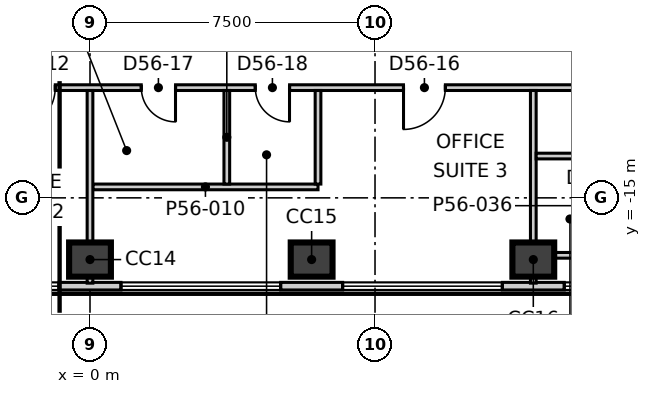
"""IFC4 building model, lengths in metres.
Left out: names, types, materials, properties, quantities, classifications, styles, units other than length and angle.
Written with IfcOpenShell. Run it as: python <this file> out.ifc"""

import sys

from ifc_helpers import new_model, si_unit, direction, frame, frame_2d, origin, origin_2d, place, context, subcontext, project, spatial, rectangle, extrude, element, fill, save


model = new_model("IFC4")
c1 = context("Model", 3, precision=1e-05, world=origin(), true_north=direction((0.0, 1.0)))
c2 = subcontext(c1, "Body", "Model", "MODEL_VIEW")
j1 = project(units=[si_unit("LENGTHUNIT", "METRE"), si_unit("PLANEANGLEUNIT", "RADIAN")], contexts=[c1])
p1 = place(None, origin())
s1 = spatial("IfcSite", under=j1, at=p1, CompositionType="ELEMENT")
p2 = place(p1, origin())
s2 = spatial("IfcBuilding", under=s1, at=p2, CompositionType="ELEMENT")
p3 = place(p2, frame((0.0, 0.0, 239.3)))
s3 = spatial("IfcBuildingStorey", under=s2, at=p3, CompositionType="ELEMENT", Elevation=239.3)
for number, where, z_axis, x_axis in (
    (1, (0.0, -16.624, -0.3), (0.0, 0.0, 1.0), (1.0, 0.0, 0.0)),
    (2, (5.832, -16.624, -0.3), (0.0, 0.0, 1.0), (1.0, 0.0, 0.0)),
    (3, (11.665, -16.624, -0.3), (0.0, 0.0, 1.0), (1.0, 0.0, 0.0)),
):
    element("IfcColumn", number, at=place(p3, frame(where, z_axis=z_axis, x_axis=x_axis)), inside=s3, PredefinedType="COLUMN", context=c2, shape_type="SweptSolid", body=[
        extrude(rectangle(XDim=1.1, YDim=0.9, at=origin_2d()), origin(), (0.0, 0.0, 1.0), 4.0),
    ])
p4 = place(p3, frame((-24.633, -17.324, 0.0), z_axis=(0.0, 0.0, 1.0), x_axis=(1.0, 0.0, 0.0)))
e4 = element("IfcWall", 4, at=p4, inside=s3, PredefinedType="ELEMENTEDWALL", context=c2, shape_type="SweptSolid", body=[
    extrude(rectangle(XDim=49.246, YDim=0.2, at=frame_2d((24.623, 0.0))), origin(), (0.0, 0.0, 1.0), 3.7),
])
p5 = place(p4, frame((2.119, 0.0, 0.9)))
e5 = element("IfcOpeningElement", 5, at=p5, cuts=e4, PredefinedType="OPENING", context=c2, shape_type="SweptSolid", body=[
    extrude(rectangle(XDim=4.2, YDim=2.5, at=frame_2d((2.1, 1.25))), frame((0.0, 0.11, 0.0), z_axis=(0.0, -1.0, 0.0), x_axis=(1.0, 0.0, 0.0)), (0.0, 0.0, 1.0), 0.22),
])
p6 = place(p4, frame((7.952, 0.0, 0.9)))
e6 = element("IfcOpeningElement", 6, at=p6, cuts=e4, PredefinedType="OPENING", context=c2, shape_type="SweptSolid", body=[
    extrude(rectangle(XDim=4.2, YDim=2.5, at=frame_2d((2.1, 1.25))), frame((0.0, 0.11, 0.0), z_axis=(0.0, -1.0, 0.0), x_axis=(1.0, 0.0, 0.0)), (0.0, 0.0, 1.0), 0.22),
])
p7 = place(p4, frame((13.784, 0.0, 0.9)))
e7 = element("IfcOpeningElement", 7, at=p7, cuts=e4, PredefinedType="OPENING", context=c2, shape_type="SweptSolid", body=[
    extrude(rectangle(XDim=4.2, YDim=2.5, at=frame_2d((2.1, 1.25))), frame((0.0, 0.11, 0.0), z_axis=(0.0, -1.0, 0.0), x_axis=(1.0, 0.0, 0.0)), (0.0, 0.0, 1.0), 0.22),
])
p8 = place(p4, frame((19.617, 0.0, 0.9)))
e8 = element("IfcOpeningElement", 8, at=p8, cuts=e4, PredefinedType="OPENING", context=c2, shape_type="SweptSolid", body=[
    extrude(rectangle(XDim=4.2, YDim=2.5, at=frame_2d((2.1, 1.25))), frame((0.0, 0.11, 0.0), z_axis=(0.0, -1.0, 0.0), x_axis=(1.0, 0.0, 0.0)), (0.0, 0.0, 1.0), 0.22),
])
p9 = place(p4, frame((25.449, 0.0, 0.9)))
e9 = element("IfcOpeningElement", 9, at=p9, cuts=e4, PredefinedType="OPENING", context=c2, shape_type="SweptSolid", body=[
    extrude(rectangle(XDim=4.2, YDim=2.5, at=frame_2d((2.1, 1.25))), frame((0.0, 0.11, 0.0), z_axis=(0.0, -1.0, 0.0), x_axis=(1.0, 0.0, 0.0)), (0.0, 0.0, 1.0), 0.22),
])
p10 = place(p4, frame((31.282, 0.0, 0.9)))
e10 = element("IfcOpeningElement", 10, at=p10, cuts=e4, PredefinedType="OPENING", context=c2, shape_type="SweptSolid", body=[
    extrude(rectangle(XDim=4.2, YDim=2.5, at=frame_2d((2.1, 1.25))), frame((0.0, 0.11, 0.0), z_axis=(0.0, -1.0, 0.0), x_axis=(1.0, 0.0, 0.0)), (0.0, 0.0, 1.0), 0.22),
])
p11 = place(p4, frame((37.114, 0.0, 0.9)))
e11 = element("IfcOpeningElement", 11, at=p11, cuts=e4, PredefinedType="OPENING", context=c2, shape_type="SweptSolid", body=[
    extrude(rectangle(XDim=4.2, YDim=2.5, at=frame_2d((2.1, 1.25))), frame((0.0, 0.11, 0.0), z_axis=(0.0, -1.0, 0.0), x_axis=(1.0, 0.0, 0.0)), (0.0, 0.0, 1.0), 0.22),
])
p12 = place(p4, frame((42.947, 0.0, 0.9)))
e12 = element("IfcOpeningElement", 12, at=p12, cuts=e4, PredefinedType="OPENING", context=c2, shape_type="SweptSolid", body=[
    extrude(rectangle(XDim=4.2, YDim=2.5, at=frame_2d((2.1, 1.25))), frame((0.0, 0.11, 0.0), z_axis=(0.0, -1.0, 0.0), x_axis=(1.0, 0.0, 0.0)), (0.0, 0.0, 1.0), 0.22),
])
p13 = place(p3, frame((27.32, -12.671, 0.0), z_axis=(0.0, 0.0, 1.0), x_axis=(-0.499995097538, 0.866028234204, 0.0)))
e13 = element("IfcWall", 13, at=p13, inside=s3, PredefinedType="ELEMENTEDWALL", context=c2, shape_type="SweptSolid", body=[
    extrude(rectangle(XDim=49.247, YDim=0.2, at=frame_2d((24.623, 0.0))), origin(), (0.0, 0.0, 1.0), 3.7),
])
p14 = place(p13, frame((2.119, 0.0, 0.9)))
e14 = element("IfcOpeningElement", 14, at=p14, cuts=e13, PredefinedType="OPENING", context=c2, shape_type="SweptSolid", body=[
    extrude(rectangle(XDim=4.2, YDim=2.5, at=frame_2d((2.1, 1.25))), frame((0.0, 0.11, 0.0), z_axis=(0.0, -1.0, 0.0), x_axis=(1.0, 0.0, 0.0)), (0.0, 0.0, 1.0), 0.22),
])
p15 = place(p13, frame((7.952, 0.0, 0.9)))
e15 = element("IfcOpeningElement", 15, at=p15, cuts=e13, PredefinedType="OPENING", context=c2, shape_type="SweptSolid", body=[
    extrude(rectangle(XDim=4.2, YDim=2.5, at=frame_2d((2.1, 1.25))), frame((0.0, 0.11, 0.0), z_axis=(0.0, -1.0, 0.0), x_axis=(1.0, 0.0, 0.0)), (0.0, 0.0, 1.0), 0.22),
])
p16 = place(p13, frame((13.784, 0.0, 0.9)))
e16 = element("IfcOpeningElement", 16, at=p16, cuts=e13, PredefinedType="OPENING", context=c2, shape_type="SweptSolid", body=[
    extrude(rectangle(XDim=4.2, YDim=2.5, at=frame_2d((2.1, 1.25))), frame((0.0, 0.11, 0.0), z_axis=(0.0, -1.0, 0.0), x_axis=(1.0, 0.0, 0.0)), (0.0, 0.0, 1.0), 0.22),
])
p17 = place(p13, frame((19.617, 0.0, 0.9)))
e17 = element("IfcOpeningElement", 17, at=p17, cuts=e13, PredefinedType="OPENING", context=c2, shape_type="SweptSolid", body=[
    extrude(rectangle(XDim=4.2, YDim=2.5, at=frame_2d((2.1, 1.25))), frame((0.0, 0.11, 0.0), z_axis=(0.0, -1.0, 0.0), x_axis=(1.0, 0.0, 0.0)), (0.0, 0.0, 1.0), 0.22),
])
p18 = place(p13, frame((25.45, 0.0, 0.9)))
e18 = element("IfcOpeningElement", 18, at=p18, cuts=e13, PredefinedType="OPENING", context=c2, shape_type="SweptSolid", body=[
    extrude(rectangle(XDim=4.2, YDim=2.5, at=frame_2d((2.1, 1.25))), frame((0.0, 0.11, 0.0), z_axis=(0.0, -1.0, 0.0), x_axis=(1.0, 0.0, 0.0)), (0.0, 0.0, 1.0), 0.22),
])
p19 = place(p13, frame((31.282, 0.0, 0.9)))
e19 = element("IfcOpeningElement", 19, at=p19, cuts=e13, PredefinedType="OPENING", context=c2, shape_type="SweptSolid", body=[
    extrude(rectangle(XDim=4.2, YDim=2.5, at=frame_2d((2.1, 1.25))), frame((0.0, 0.11, 0.0), z_axis=(0.0, -1.0, 0.0), x_axis=(1.0, 0.0, 0.0)), (0.0, 0.0, 1.0), 0.22),
])
p20 = place(p13, frame((37.115, 0.0, 0.9)))
e20 = element("IfcOpeningElement", 20, at=p20, cuts=e13, PredefinedType="OPENING", context=c2, shape_type="SweptSolid", body=[
    extrude(rectangle(XDim=4.2, YDim=2.5, at=frame_2d((2.1, 1.25))), frame((0.0, 0.11, 0.0), z_axis=(0.0, -1.0, 0.0), x_axis=(1.0, 0.0, 0.0)), (0.0, 0.0, 1.0), 0.22),
])
p21 = place(p13, frame((42.947, 0.0, 0.9)))
e21 = element("IfcOpeningElement", 21, at=p21, cuts=e13, PredefinedType="OPENING", context=c2, shape_type="SweptSolid", body=[
    extrude(rectangle(XDim=4.2, YDim=2.5, at=frame_2d((2.1, 1.25))), frame((0.0, 0.11, 0.0), z_axis=(0.0, -1.0, 0.0), x_axis=(1.0, 0.0, 0.0)), (0.0, 0.0, 1.0), 0.22),
])
p22 = place(p3, frame((-20.807, -12.1, 0.0), z_axis=(0.0, 0.0, 1.0), x_axis=(1.0, 0.0, 0.0)))
e22 = element("IfcWall", 22, at=p22, inside=s3, PredefinedType="PARTITIONING", context=c2, shape_type="SweptSolid", body=[
    extrude(rectangle(XDim=41.764, YDim=0.15, at=frame_2d((20.882, 0.0))), origin(), (0.0, 0.0, 1.0), 3.7),
])
p23 = place(p22, frame((3.9, 0.0, 0.0)))
e23 = element("IfcOpeningElement", 23, at=p23, cuts=e22, PredefinedType="OPENING", context=c2, shape_type="SweptSolid", body=[
    extrude(rectangle(XDim=1.1, YDim=2.1, at=frame_2d((0.55, 1.05))), frame((0.0, 0.085, 0.0), z_axis=(0.0, -1.0, 0.0), x_axis=(1.0, 0.0, 0.0)), (0.0, 0.0, 1.0), 0.17),
])
p24 = place(p22, frame((18.792, 0.0, 0.0)))
e24 = element("IfcOpeningElement", 24, at=p24, cuts=e22, PredefinedType="OPENING", context=c2, shape_type="SweptSolid", body=[
    extrude(rectangle(XDim=1.1, YDim=2.1, at=frame_2d((0.55, 1.05))), frame((0.0, 0.085, 0.0), z_axis=(0.0, -1.0, 0.0), x_axis=(1.0, 0.0, 0.0)), (0.0, 0.0, 1.0), 0.17),
])
p25 = place(p22, frame((10.292, 0.0, 0.0)))
e25 = element("IfcOpeningElement", 25, at=p25, cuts=e22, PredefinedType="OPENING", context=c2, shape_type="SweptSolid", body=[
    extrude(rectangle(XDim=0.9, YDim=2.1, at=frame_2d((0.45, 1.05))), frame((0.0, 0.085, 0.0), z_axis=(0.0, -1.0, 0.0), x_axis=(1.0, 0.0, 0.0)), (0.0, 0.0, 1.0), 0.17),
])
p26 = place(p22, frame((13.492, 0.0, 0.0)))
e26 = element("IfcOpeningElement", 26, at=p26, cuts=e22, PredefinedType="OPENING", context=c2, shape_type="SweptSolid", body=[
    extrude(rectangle(XDim=0.9, YDim=2.1, at=frame_2d((0.45, 1.05))), frame((0.0, 0.085, 0.0), z_axis=(0.0, -1.0, 0.0), x_axis=(1.0, 0.0, 0.0)), (0.0, 0.0, 1.0), 0.17),
])
p27 = place(p22, frame((16.292, 0.0, 0.0)))
e27 = element("IfcOpeningElement", 27, at=p27, cuts=e22, PredefinedType="OPENING", context=c2, shape_type="SweptSolid", body=[
    extrude(rectangle(XDim=1.0, YDim=2.1, at=frame_2d((0.5, 1.05))), frame((0.0, 0.085, 0.0), z_axis=(0.0, -1.0, 0.0), x_axis=(1.0, 0.0, 0.0)), (0.0, 0.0, 1.0), 0.17),
])
p28 = place(p22, frame((29.057, 0.0, 0.0)))
e28 = element("IfcOpeningElement", 28, at=p28, cuts=e22, PredefinedType="OPENING", context=c2, shape_type="SweptSolid", body=[
    extrude(rectangle(XDim=1.1, YDim=2.1, at=frame_2d((0.55, 1.05))), frame((0.0, 0.085, 0.0), z_axis=(0.0, -1.0, 0.0), x_axis=(1.0, 0.0, 0.0)), (0.0, 0.0, 1.0), 0.17),
])
p29 = place(p22, frame((22.157, 0.0, 0.0)))
e29 = element("IfcOpeningElement", 29, at=p29, cuts=e22, PredefinedType="OPENING", context=c2, shape_type="SweptSolid", body=[
    extrude(rectangle(XDim=0.9, YDim=2.1, at=frame_2d((0.45, 1.05))), frame((0.0, 0.085, 0.0), z_axis=(0.0, -1.0, 0.0), x_axis=(1.0, 0.0, 0.0)), (0.0, 0.0, 1.0), 0.17),
])
p30 = place(p22, frame((25.157, 0.0, 0.0)))
e30 = element("IfcOpeningElement", 30, at=p30, cuts=e22, PredefinedType="OPENING", context=c2, shape_type="SweptSolid", body=[
    extrude(rectangle(XDim=0.9, YDim=2.1, at=frame_2d((0.45, 1.05))), frame((0.0, 0.085, 0.0), z_axis=(0.0, -1.0, 0.0), x_axis=(1.0, 0.0, 0.0)), (0.0, 0.0, 1.0), 0.17),
])
p31 = place(p22, frame((36.522, 0.0, 0.0)))
e31 = element("IfcOpeningElement", 31, at=p31, cuts=e22, PredefinedType="OPENING", context=c2, shape_type="SweptSolid", body=[
    extrude(rectangle(XDim=1.1, YDim=2.1, at=frame_2d((0.55, 1.05))), frame((0.0, 0.085, 0.0), z_axis=(0.0, -1.0, 0.0), x_axis=(1.0, 0.0, 0.0)), (0.0, 0.0, 1.0), 0.17),
])
p32 = place(p3, frame((-20.883, -11.97, 0.0), z_axis=(0.0, 0.0, 1.0), x_axis=(0.500006150555, 0.866021852731, 0.0)))
e32 = element("IfcWall", 32, at=p32, inside=s3, PredefinedType="PARTITIONING", context=c2, shape_type="SweptSolid", body=[
    extrude(rectangle(XDim=41.766, YDim=0.15, at=frame_2d((20.883, 0.0))), origin(), (0.0, 0.0, 1.0), 3.7),
])
p33 = place(p32, frame((36.616, 0.0, 0.0)))
e33 = element("IfcOpeningElement", 33, at=p33, cuts=e32, PredefinedType="OPENING", context=c2, shape_type="SweptSolid", body=[
    extrude(rectangle(XDim=1.1, YDim=2.1, at=frame_2d((0.55, 1.05))), frame((0.0, 0.085, 0.0), z_axis=(0.0, -1.0, 0.0), x_axis=(1.0, 0.0, 0.0)), (0.0, 0.0, 1.0), 0.17),
])
p34 = place(p32, frame((21.723, 0.0, 0.0)))
e34 = element("IfcOpeningElement", 34, at=p34, cuts=e32, PredefinedType="OPENING", context=c2, shape_type="SweptSolid", body=[
    extrude(rectangle(XDim=1.1, YDim=2.1, at=frame_2d((0.55, 1.05))), frame((0.0, 0.085, 0.0), z_axis=(0.0, -1.0, 0.0), x_axis=(1.0, 0.0, 0.0)), (0.0, 0.0, 1.0), 0.17),
])
p35 = place(p32, frame((30.423, 0.0, 0.0)))
e35 = element("IfcOpeningElement", 35, at=p35, cuts=e32, PredefinedType="OPENING", context=c2, shape_type="SweptSolid", body=[
    extrude(rectangle(XDim=0.9, YDim=2.1, at=frame_2d((0.45, 1.05))), frame((0.0, 0.085, 0.0), z_axis=(0.0, -1.0, 0.0), x_axis=(1.0, 0.0, 0.0)), (0.0, 0.0, 1.0), 0.17),
])
p36 = place(p32, frame((27.223, 0.0, 0.0)))
e36 = element("IfcOpeningElement", 36, at=p36, cuts=e32, PredefinedType="OPENING", context=c2, shape_type="SweptSolid", body=[
    extrude(rectangle(XDim=0.9, YDim=2.1, at=frame_2d((0.45, 1.05))), frame((0.0, 0.085, 0.0), z_axis=(0.0, -1.0, 0.0), x_axis=(1.0, 0.0, 0.0)), (0.0, 0.0, 1.0), 0.17),
])
p37 = place(p32, frame((24.323, 0.0, 0.0)))
e37 = element("IfcOpeningElement", 37, at=p37, cuts=e32, PredefinedType="OPENING", context=c2, shape_type="SweptSolid", body=[
    extrude(rectangle(XDim=1.0, YDim=2.1, at=frame_2d((0.5, 1.05))), frame((0.0, 0.085, 0.0), z_axis=(0.0, -1.0, 0.0), x_axis=(1.0, 0.0, 0.0)), (0.0, 0.0, 1.0), 0.17),
])
p38 = place(p32, frame((17.358, 0.0, 0.0)))
e38 = element("IfcOpeningElement", 38, at=p38, cuts=e32, PredefinedType="OPENING", context=c2, shape_type="SweptSolid", body=[
    extrude(rectangle(XDim=1.0, YDim=2.1, at=frame_2d((0.5, 1.05))), frame((0.0, 0.085, 0.0), z_axis=(0.0, -1.0, 0.0), x_axis=(1.0, 0.0, 0.0)), (0.0, 0.0, 1.0), 0.17),
])
p39 = place(p32, frame((6.825, 0.0, 0.0)))
e39 = element("IfcOpeningElement", 39, at=p39, cuts=e32, PredefinedType="OPENING", context=c2, shape_type="SweptSolid", body=[
    extrude(rectangle(XDim=1.1, YDim=2.1, at=frame_2d((0.55, 1.05))), frame((0.0, 0.085, 0.0), z_axis=(0.0, -1.0, 0.0), x_axis=(1.0, 0.0, 0.0)), (0.0, 0.0, 1.0), 0.17),
])
p40 = place(p3, frame((0.075, -14.712, 0.0), z_axis=(0.0, 0.0, 1.0), x_axis=(1.0, 0.0, 0.0)))
e40 = element("IfcWall", 40, at=p40, inside=s3, PredefinedType="PARTITIONING", context=c2, shape_type="SweptSolid", body=[
    extrude(rectangle(XDim=5.925, YDim=0.15, at=frame_2d((2.962, 0.0))), origin(), (0.0, 0.0, 1.0), 3.7),
])
p41 = place(p3, frame((0.0, -17.244, 0.0), z_axis=(0.0, 0.0, 1.0), x_axis=(0.0, 1.0, 0.0)))
e41 = element("IfcWall", 41, at=p41, inside=s3, PredefinedType="PARTITIONING", context=c2, shape_type="SweptSolid", body=[
    extrude(rectangle(XDim=5.069, YDim=0.15, at=frame_2d((2.534, 0.0))), origin(), (0.0, 0.0, 1.0), 3.2),
])
p42 = place(p3, frame((0.075, 24.07, 0.0), z_axis=(0.0, 0.0, 1.0), x_axis=(0.500006834213, -0.866021458014, 0.0)))
e42 = element("IfcWall", 42, at=p42, inside=s3, PredefinedType="PARTITIONING", context=c2, shape_type="SweptSolid", body=[
    extrude(rectangle(XDim=41.616, YDim=0.15, at=frame_2d((20.808, 0.0))), origin(), (0.0, 0.0, 1.0), 3.7),
])
p43 = place(p42, frame((36.616, 0.0, 0.0)))
e43 = element("IfcOpeningElement", 43, at=p43, cuts=e42, PredefinedType="OPENING", context=c2, shape_type="SweptSolid", body=[
    extrude(rectangle(XDim=1.1, YDim=2.1, at=frame_2d((0.55, 1.05))), frame((0.0, 0.085, 0.0), z_axis=(0.0, -1.0, 0.0), x_axis=(1.0, 0.0, 0.0)), (0.0, 0.0, 1.0), 0.17),
])
p44 = place(p42, frame((29.024, 0.0, 0.0)))
e44 = element("IfcOpeningElement", 44, at=p44, cuts=e42, PredefinedType="OPENING", context=c2, shape_type="SweptSolid", body=[
    extrude(rectangle(XDim=1.0, YDim=2.1, at=frame_2d((0.5, 1.05))), frame((0.0, 0.085, 0.0), z_axis=(0.0, -1.0, 0.0), x_axis=(1.0, 0.0, 0.0)), (0.0, 0.0, 1.0), 0.17),
])
p45 = place(p42, frame((23.19, 0.0, 0.0)))
e45 = element("IfcOpeningElement", 45, at=p45, cuts=e42, PredefinedType="OPENING", context=c2, shape_type="SweptSolid", body=[
    extrude(rectangle(XDim=1.0, YDim=2.1, at=frame_2d((0.5, 1.05))), frame((0.0, 0.085, 0.0), z_axis=(0.0, -1.0, 0.0), x_axis=(1.0, 0.0, 0.0)), (0.0, 0.0, 1.0), 0.17),
])
p46 = place(p42, frame((14.458, 0.0, 0.0)))
e46 = element("IfcOpeningElement", 46, at=p46, cuts=e42, PredefinedType="OPENING", context=c2, shape_type="SweptSolid", body=[
    extrude(rectangle(XDim=1.1, YDim=2.1, at=frame_2d((0.55, 1.05))), frame((0.0, 0.085, 0.0), z_axis=(0.0, -1.0, 0.0), x_axis=(1.0, 0.0, 0.0)), (0.0, 0.0, 1.0), 0.17),
])
p47 = place(p42, frame((3.993, 0.0, 0.0)))
e47 = element("IfcOpeningElement", 47, at=p47, cuts=e42, PredefinedType="OPENING", context=c2, shape_type="SweptSolid", body=[
    extrude(rectangle(XDim=1.1, YDim=2.1, at=frame_2d((0.55, 1.05))), frame((0.0, 0.085, 0.0), z_axis=(0.0, -1.0, 0.0), x_axis=(1.0, 0.0, 0.0)), (0.0, 0.0, 1.0), 0.17),
])
for number, where, z_axis, x_axis in (
    (48, (6.0, -14.637, 0.0), (0.0, 0.0, 1.0), (0.0, 1.0, 0.0)),
    (49, (3.6, -14.637, 0.0), (0.0, 0.0, 1.0), (0.0, 1.0, 0.0)),
):
    element("IfcWall", number, at=place(p3, frame(where, z_axis=z_axis, x_axis=x_axis)), inside=s3, PredefinedType="PARTITIONING", context=c2, shape_type="SweptSolid", body=[
        extrude(rectangle(XDim=2.462, YDim=0.15, at=frame_2d((1.231, 0.0))), origin(), (0.0, 0.0, 1.0), 3.7),
    ])
p48 = place(p3, frame((11.665, -17.244, 0.0), z_axis=(0.0, 0.0, 1.0), x_axis=(0.0, 1.0, 0.0)))
e50 = element("IfcWall", 50, at=p48, inside=s3, PredefinedType="PARTITIONING", context=c2, shape_type="SweptSolid", body=[
    extrude(rectangle(XDim=5.069, YDim=0.15, at=frame_2d((2.534, 0.0))), origin(), (0.0, 0.0, 1.0), 3.7),
])
p49 = place(p3, frame((11.74, -16.512, 0.0), z_axis=(0.0, 0.0, 1.0), x_axis=(1.0, 0.0, 0.0)))
e51 = element("IfcWall", 51, at=p49, inside=s3, PredefinedType="PARTITIONING", context=c2, shape_type="SweptSolid", body=[
    extrude(rectangle(XDim=5.725, YDim=0.15, at=frame_2d((2.863, 0.0))), origin(), (0.0, 0.0, 1.0), 2.95),
])
p50 = place(p3, frame((11.74, -13.9, 0.0), z_axis=(0.0, 0.0, 1.0), x_axis=(1.0, 0.0, 0.0)))
e52 = element("IfcWall", 52, at=p50, inside=s3, PredefinedType="PARTITIONING", context=c2, shape_type="SweptSolid", body=[
    extrude(rectangle(XDim=5.725, YDim=0.15, at=frame_2d((2.863, 0.0))), origin(), (0.0, 0.0, 1.0), 3.7),
])
p51 = place(p50, frame((1.275, 0.0, 0.0)))
e53 = element("IfcOpeningElement", 53, at=p51, cuts=e52, PredefinedType="OPENING", context=c2, shape_type="SweptSolid", body=[
    extrude(rectangle(XDim=0.9, YDim=2.1, at=frame_2d((0.45, 1.05))), frame((0.0, 0.085, 0.0), z_axis=(0.0, -1.0, 0.0), x_axis=(1.0, 0.0, 0.0)), (0.0, 0.0, 1.0), 0.17),
])
p52 = place(p8, origin())
e54 = element("IfcWindow", 54, at=p52, inside=s3, PartitioningType="SINGLE_PANEL", PredefinedType="WINDOW", context=c2, shape_type="SweptSolid", body=[
    extrude(rectangle(XDim=4.2, YDim=2.5, at=frame_2d((2.1, 1.25))), frame((0.0, 0.03, 0.0), z_axis=(0.0, -1.0, 0.0), x_axis=(1.0, 0.0, 0.0)), (0.0, 0.0, 1.0), 0.06),
])
fill(e8, e54)
p53 = place(p9, origin())
e55 = element("IfcWindow", 55, at=p53, inside=s3, PartitioningType="SINGLE_PANEL", PredefinedType="WINDOW", context=c2, shape_type="SweptSolid", body=[
    extrude(rectangle(XDim=4.2, YDim=2.5, at=frame_2d((2.1, 1.25))), frame((0.0, 0.03, 0.0), z_axis=(0.0, -1.0, 0.0), x_axis=(1.0, 0.0, 0.0)), (0.0, 0.0, 1.0), 0.06),
])
fill(e9, e55)
p54 = place(p10, origin())
e56 = element("IfcWindow", 56, at=p54, inside=s3, PartitioningType="SINGLE_PANEL", PredefinedType="WINDOW", context=c2, shape_type="SweptSolid", body=[
    extrude(rectangle(XDim=4.2, YDim=2.5, at=frame_2d((2.1, 1.25))), frame((0.0, 0.03, 0.0), z_axis=(0.0, -1.0, 0.0), x_axis=(1.0, 0.0, 0.0)), (0.0, 0.0, 1.0), 0.06),
])
fill(e10, e56)
p55 = place(p11, origin())
e57 = element("IfcWindow", 57, at=p55, inside=s3, PartitioningType="SINGLE_PANEL", PredefinedType="WINDOW", context=c2, shape_type="SweptSolid", body=[
    extrude(rectangle(XDim=4.2, YDim=2.5, at=frame_2d((2.1, 1.25))), frame((0.0, 0.03, 0.0), z_axis=(0.0, -1.0, 0.0), x_axis=(1.0, 0.0, 0.0)), (0.0, 0.0, 1.0), 0.06),
])
fill(e11, e57)
p56 = place(p24, origin())
e58 = element("IfcDoor", 58, at=p56, inside=s3, OperationType="SINGLE_SWING_LEFT", PredefinedType="DOOR", context=c2, shape_type="SweptSolid", body=[
    extrude(rectangle(XDim=1.1, YDim=2.1, at=frame_2d((0.55, 1.05))), frame((0.0, 0.025, 0.0), z_axis=(0.0, -1.0, 0.0), x_axis=(1.0, 0.0, 0.0)), (0.0, 0.0, 1.0), 0.05),
])
fill(e24, e58)
p57 = place(p28, origin())
e59 = element("IfcDoor", 59, at=p57, inside=s3, OperationType="SINGLE_SWING_LEFT", PredefinedType="DOOR", context=c2, shape_type="SweptSolid", body=[
    extrude(rectangle(XDim=1.1, YDim=2.1, at=frame_2d((0.55, 1.05))), frame((0.0, 0.025, 0.0), z_axis=(0.0, -1.0, 0.0), x_axis=(1.0, 0.0, 0.0)), (0.0, 0.0, 1.0), 0.05),
])
fill(e28, e59)
p58 = place(p29, origin())
e60 = element("IfcDoor", 60, at=p58, inside=s3, OperationType="SINGLE_SWING_RIGHT", PredefinedType="DOOR", context=c2, shape_type="SweptSolid", body=[
    extrude(rectangle(XDim=0.9, YDim=2.1, at=frame_2d((0.45, 1.05))), frame((0.0, 0.025, 0.0), z_axis=(0.0, -1.0, 0.0), x_axis=(1.0, 0.0, 0.0)), (0.0, 0.0, 1.0), 0.05),
])
fill(e29, e60)
p59 = place(p30, origin())
e61 = element("IfcDoor", 61, at=p59, inside=s3, OperationType="SINGLE_SWING_RIGHT", PredefinedType="DOOR", context=c2, shape_type="SweptSolid", body=[
    extrude(rectangle(XDim=0.9, YDim=2.1, at=frame_2d((0.45, 1.05))), frame((0.0, 0.025, 0.0), z_axis=(0.0, -1.0, 0.0), x_axis=(1.0, 0.0, 0.0)), (0.0, 0.0, 1.0), 0.05),
])
fill(e30, e61)
save(model, sys.argv[1])
